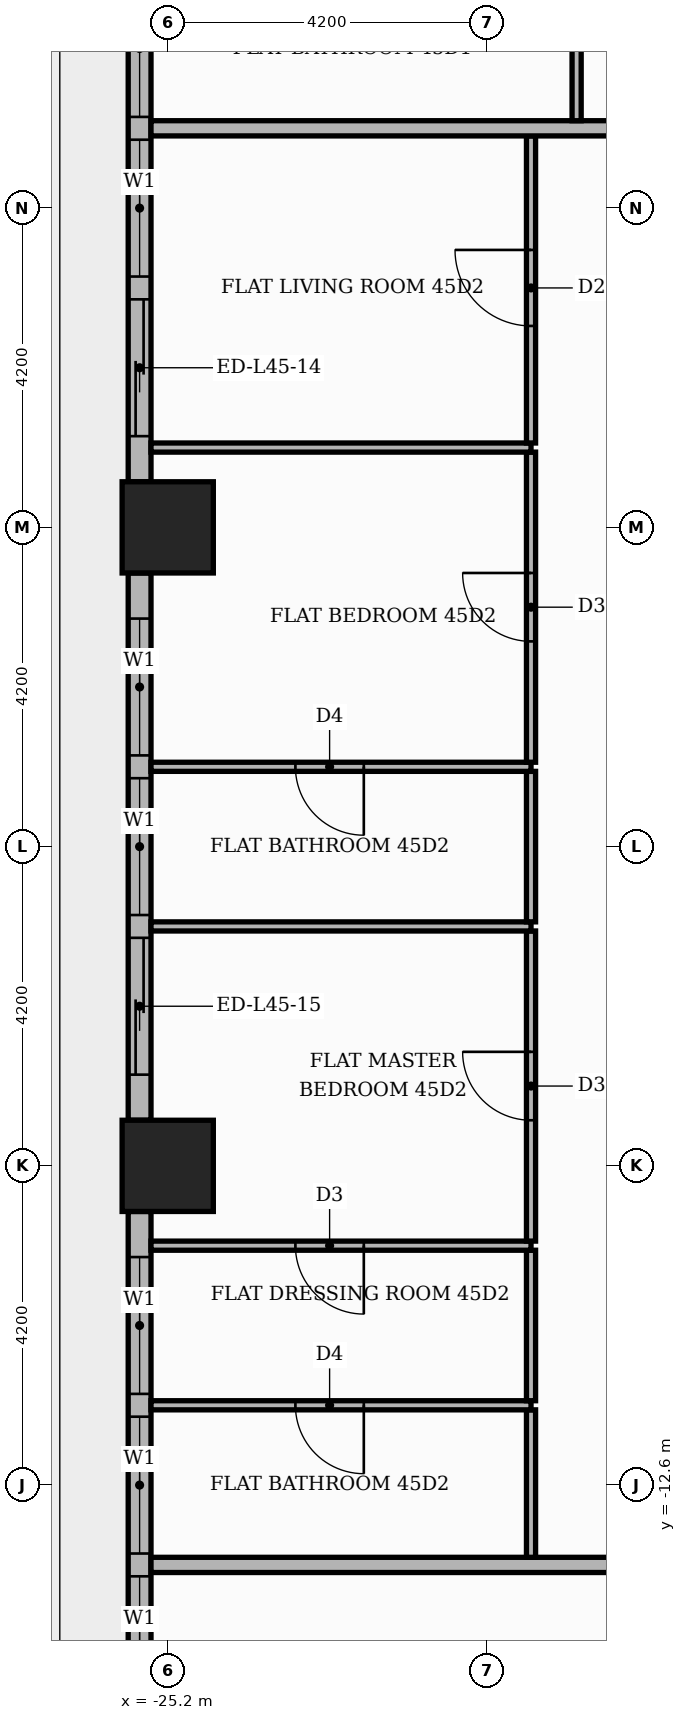
"""IFC4 building model, lengths in metres.
Left out: names, types, materials, properties, quantities, classifications, styles, units other than length and angle.
Written with IfcOpenShell. Run it as: python <this file> out.ifc"""

import sys

from ifc_helpers import new_model, si_unit, direction, frame, frame_2d, origin, origin_2d, place, context, subcontext, project, spatial, rectangle, extrude, element, fill, save


model = new_model("IFC4")
c1 = context("Model", 3, precision=1e-05, world=origin(), true_north=direction((0.0, 1.0)))
c2 = subcontext(c1, "Body", "Model", "MODEL_VIEW")
j1 = project(units=[si_unit("LENGTHUNIT", "METRE"), si_unit("PLANEANGLEUNIT", "RADIAN")], contexts=[c1])
p1 = place(None, origin())
s1 = spatial("IfcSite", under=j1, at=p1, CompositionType="ELEMENT")
p2 = place(p1, origin())
s2 = spatial("IfcBuilding", under=s1, at=p2, CompositionType="ELEMENT")
p3 = place(p2, frame((0.0, 0.0, 192.3)))
s3 = spatial("IfcBuildingStorey", under=s2, at=p3, CompositionType="ELEMENT", Elevation=192.3)
for number, where, z_axis, x_axis in (
    (1, (-25.2, 0.0, 0.0), (0.0, 0.0, 1.0), (1.0, 0.0, 0.0)),
    (2, (-25.2, -8.4, 0.0), (0.0, 0.0, 1.0), (1.0, 0.0, 0.0)),
):
    element("IfcColumn", number, at=place(p3, frame(where, z_axis=z_axis, x_axis=x_axis)), inside=s3, PredefinedType="COLUMN", context=c2, shape_type="SweptSolid", body=[
        extrude(rectangle(XDim=1.2, YDim=1.2, at=origin_2d()), origin(), (0.0, 0.0, 1.0), 3.9),
    ])
p4 = place(p3, frame((-25.57, 7.8, 0.0), z_axis=(0.0, 0.0, 1.0), x_axis=(0.0, -1.0, 0.0)))
e3 = element("IfcWall", 3, at=p4, inside=s3, PredefinedType="STANDARD", context=c2, shape_type="SweptSolid", body=[
    extrude(rectangle(XDim=7.2, YDim=0.3, at=frame_2d((3.6, 0.0))), origin(), (0.0, 0.0, 1.0), 3.48),
])
p5 = place(p4, frame((0.6, 0.0, 0.9)))
e4 = element("IfcOpeningElement", 4, at=p5, cuts=e3, PredefinedType="OPENING", context=c2, shape_type="SweptSolid", body=[
    extrude(rectangle(XDim=1.8, YDim=2.1, at=frame_2d((0.9, 1.05))), frame((0.0, 0.16, 0.0), z_axis=(0.0, -1.0, 0.0), x_axis=(1.0, 0.0, 0.0)), (0.0, 0.0, 1.0), 0.32),
])
p6 = place(p4, frame((2.7, 0.0, 0.9)))
e5 = element("IfcOpeningElement", 5, at=p6, cuts=e3, PredefinedType="OPENING", context=c2, shape_type="SweptSolid", body=[
    extrude(rectangle(XDim=1.8, YDim=2.1, at=frame_2d((0.9, 1.05))), frame((0.0, 0.16, 0.0), z_axis=(0.0, -1.0, 0.0), x_axis=(1.0, 0.0, 0.0)), (0.0, 0.0, 1.0), 0.32),
])
p7 = place(p4, frame((4.8, 0.0, 0.0)))
e6 = element("IfcOpeningElement", 6, at=p7, cuts=e3, PredefinedType="OPENING", context=c2, shape_type="SweptSolid", body=[
    extrude(rectangle(XDim=1.8, YDim=2.4, at=frame_2d((0.9, 1.2))), frame((0.0, 0.16, 0.0), z_axis=(0.0, -1.0, 0.0), x_axis=(1.0, 0.0, 0.0)), (0.0, 0.0, 1.0), 0.32),
])
p8 = place(p3, frame((-25.57, -0.6, 0.0), z_axis=(0.0, 0.0, 1.0), x_axis=(0.0, -1.0, 0.0)))
e7 = element("IfcWall", 7, at=p8, inside=s3, PredefinedType="STANDARD", context=c2, shape_type="SweptSolid", body=[
    extrude(rectangle(XDim=7.2, YDim=0.3, at=frame_2d((3.6, 0.0))), origin(), (0.0, 0.0, 1.0), 3.48),
])
p9 = place(p8, frame((0.6, 0.0, 0.9)))
e8 = element("IfcOpeningElement", 8, at=p9, cuts=e7, PredefinedType="OPENING", context=c2, shape_type="SweptSolid", body=[
    extrude(rectangle(XDim=1.8, YDim=2.1, at=frame_2d((0.9, 1.05))), frame((0.0, 0.16, 0.0), z_axis=(0.0, -1.0, 0.0), x_axis=(1.0, 0.0, 0.0)), (0.0, 0.0, 1.0), 0.32),
])
p10 = place(p8, frame((2.7, 0.0, 0.9)))
e9 = element("IfcOpeningElement", 9, at=p10, cuts=e7, PredefinedType="OPENING", context=c2, shape_type="SweptSolid", body=[
    extrude(rectangle(XDim=1.8, YDim=2.1, at=frame_2d((0.9, 1.05))), frame((0.0, 0.16, 0.0), z_axis=(0.0, -1.0, 0.0), x_axis=(1.0, 0.0, 0.0)), (0.0, 0.0, 1.0), 0.32),
])
p11 = place(p8, frame((4.8, 0.0, 0.0)))
e10 = element("IfcOpeningElement", 10, at=p11, cuts=e7, PredefinedType="OPENING", context=c2, shape_type="SweptSolid", body=[
    extrude(rectangle(XDim=1.8, YDim=2.4, at=frame_2d((0.9, 1.2))), frame((0.0, 0.16, 0.0), z_axis=(0.0, -1.0, 0.0), x_axis=(1.0, 0.0, 0.0)), (0.0, 0.0, 1.0), 0.32),
])
p12 = place(p3, frame((-25.57, -9.0, 0.0), z_axis=(0.0, 0.0, 1.0), x_axis=(0.0, -1.0, 0.0)))
e11 = element("IfcWall", 11, at=p12, inside=s3, PredefinedType="STANDARD", context=c2, shape_type="SweptSolid", body=[
    extrude(rectangle(XDim=7.2, YDim=0.3, at=frame_2d((3.6, 0.0))), origin(), (0.0, 0.0, 1.0), 3.48),
])
p13 = place(p12, frame((0.6, 0.0, 0.9)))
e12 = element("IfcOpeningElement", 12, at=p13, cuts=e11, PredefinedType="OPENING", context=c2, shape_type="SweptSolid", body=[
    extrude(rectangle(XDim=1.8, YDim=2.1, at=frame_2d((0.9, 1.05))), frame((0.0, 0.16, 0.0), z_axis=(0.0, -1.0, 0.0), x_axis=(1.0, 0.0, 0.0)), (0.0, 0.0, 1.0), 0.32),
])
p14 = place(p12, frame((2.7, 0.0, 0.9)))
e13 = element("IfcOpeningElement", 13, at=p14, cuts=e11, PredefinedType="OPENING", context=c2, shape_type="SweptSolid", body=[
    extrude(rectangle(XDim=1.8, YDim=2.1, at=frame_2d((0.9, 1.05))), frame((0.0, 0.16, 0.0), z_axis=(0.0, -1.0, 0.0), x_axis=(1.0, 0.0, 0.0)), (0.0, 0.0, 1.0), 0.32),
])
p15 = place(p12, frame((4.8, 0.0, 0.9)))
e14 = element("IfcOpeningElement", 14, at=p15, cuts=e11, PredefinedType="OPENING", context=c2, shape_type="SweptSolid", body=[
    extrude(rectangle(XDim=1.8, YDim=2.1, at=frame_2d((0.9, 1.05))), frame((0.0, 0.16, 0.0), z_axis=(0.0, -1.0, 0.0), x_axis=(1.0, 0.0, 0.0)), (0.0, 0.0, 1.0), 0.32),
])
p16 = place(p3, frame((-25.42, -13.65, 0.0), z_axis=(0.0, 0.0, 1.0), x_axis=(1.0, 0.0, 0.0)))
e15 = element("IfcWall", 15, at=p16, inside=s3, PredefinedType="PARTITIONING", context=c2, shape_type="SweptSolid", body=[
    extrude(rectangle(XDim=39.07, YDim=0.2, at=frame_2d((19.535, 0.0))), origin(), (0.0, 0.0, 1.0), 3.48),
])
p17 = place(p16, frame((13.32, 0.0, 0.0)))
e16 = element("IfcOpeningElement", 16, at=p17, cuts=e15, PredefinedType="OPENING", context=c2, shape_type="SweptSolid", body=[
    extrude(rectangle(XDim=1.1, YDim=2.4, at=frame_2d((0.55, 1.2))), frame((0.0, 0.11, 0.0), z_axis=(0.0, -1.0, 0.0), x_axis=(1.0, 0.0, 0.0)), (0.0, 0.0, 1.0), 0.22),
])
p18 = place(p16, frame((25.92, 0.0, 0.0)))
e17 = element("IfcOpeningElement", 17, at=p18, cuts=e15, PredefinedType="OPENING", context=c2, shape_type="SweptSolid", body=[
    extrude(rectangle(XDim=1.1, YDim=2.4, at=frame_2d((0.55, 1.2))), frame((0.0, 0.11, 0.0), z_axis=(0.0, -1.0, 0.0), x_axis=(1.0, 0.0, 0.0)), (0.0, 0.0, 1.0), 0.22),
])
p19 = place(p3, frame((-20.42, -13.55, 0.0), z_axis=(0.0, 0.0, 1.0), x_axis=(0.0, 1.0, 0.0)))
e18 = element("IfcWall", 18, at=p19, inside=s3, PredefinedType="PARTITIONING", context=c2, shape_type="SweptSolid", body=[
    extrude(rectangle(XDim=1.94, YDim=0.12, at=frame_2d((0.97, 0.0))), origin(), (0.0, 0.0, 1.0), 3.48),
])
p20 = place(p3, frame((-25.42, -11.55, 0.0), z_axis=(0.0, 0.0, 1.0), x_axis=(1.0, 0.0, 0.0)))
e19 = element("IfcWall", 19, at=p20, inside=s3, PredefinedType="PARTITIONING", context=c2, shape_type="SweptSolid", body=[
    extrude(rectangle(XDim=5.0, YDim=0.12, at=frame_2d((2.5, 0.0))), origin(), (0.0, 0.0, 1.0), 3.48),
])
p21 = place(p20, frame((1.9, 0.0, 0.0)))
e20 = element("IfcOpeningElement", 20, at=p21, cuts=e19, PredefinedType="OPENING", context=c2, shape_type="SweptSolid", body=[
    extrude(rectangle(XDim=0.9, YDim=2.1, at=frame_2d((0.45, 1.05))), frame((0.0, 0.07, 0.0), z_axis=(0.0, -1.0, 0.0), x_axis=(1.0, 0.0, 0.0)), (0.0, 0.0, 1.0), 0.14),
])
p22 = place(p3, frame((-20.42, -11.49, 0.0), z_axis=(0.0, 0.0, 1.0), x_axis=(0.0, 1.0, 0.0)))
e21 = element("IfcWall", 21, at=p22, inside=s3, PredefinedType="PARTITIONING", context=c2, shape_type="SweptSolid", body=[
    extrude(rectangle(XDim=1.98, YDim=0.12, at=frame_2d((0.99, 0.0))), origin(), (0.0, 0.0, 1.0), 3.48),
])
p23 = place(p3, frame((-25.42, -9.45, 0.0), z_axis=(0.0, 0.0, 1.0), x_axis=(1.0, 0.0, 0.0)))
e22 = element("IfcWall", 22, at=p23, inside=s3, PredefinedType="PARTITIONING", context=c2, shape_type="SweptSolid", body=[
    extrude(rectangle(XDim=5.0, YDim=0.12, at=frame_2d((2.5, 0.0))), origin(), (0.0, 0.0, 1.0), 3.48),
])
p24 = place(p23, frame((1.9, 0.0, 0.0)))
e23 = element("IfcOpeningElement", 23, at=p24, cuts=e22, PredefinedType="OPENING", context=c2, shape_type="SweptSolid", body=[
    extrude(rectangle(XDim=0.9, YDim=2.1, at=frame_2d((0.45, 1.05))), frame((0.0, 0.07, 0.0), z_axis=(0.0, -1.0, 0.0), x_axis=(1.0, 0.0, 0.0)), (0.0, 0.0, 1.0), 0.14),
])
p25 = place(p3, frame((-20.42, -9.39, 0.0), z_axis=(0.0, 0.0, 1.0), x_axis=(0.0, 1.0, 0.0)))
e24 = element("IfcWall", 24, at=p25, inside=s3, PredefinedType="PARTITIONING", context=c2, shape_type="SweptSolid", body=[
    extrude(rectangle(XDim=4.08, YDim=0.12, at=frame_2d((2.04, 0.0))), origin(), (0.0, 0.0, 1.0), 3.48),
])
p26 = place(p25, frame((1.59, 0.0, 0.0)))
e25 = element("IfcOpeningElement", 25, at=p26, cuts=e24, PredefinedType="OPENING", context=c2, shape_type="SweptSolid", body=[
    extrude(rectangle(XDim=0.9, YDim=2.1, at=frame_2d((0.45, 1.05))), frame((0.0, 0.07, 0.0), z_axis=(0.0, -1.0, 0.0), x_axis=(1.0, 0.0, 0.0)), (0.0, 0.0, 1.0), 0.14),
])
p27 = place(p3, frame((-25.42, -5.25, 0.0), z_axis=(0.0, 0.0, 1.0), x_axis=(1.0, 0.0, 0.0)))
e26 = element("IfcWall", 26, at=p27, inside=s3, PredefinedType="PARTITIONING", context=c2, shape_type="SweptSolid", body=[
    extrude(rectangle(XDim=5.0, YDim=0.12, at=frame_2d((2.5, 0.0))), origin(), (0.0, 0.0, 1.0), 3.48),
])
p28 = place(p3, frame((-20.42, -5.19, 0.0), z_axis=(0.0, 0.0, 1.0), x_axis=(0.0, 1.0, 0.0)))
e27 = element("IfcWall", 27, at=p28, inside=s3, PredefinedType="PARTITIONING", context=c2, shape_type="SweptSolid", body=[
    extrude(rectangle(XDim=1.98, YDim=0.12, at=frame_2d((0.99, 0.0))), origin(), (0.0, 0.0, 1.0), 3.48),
])
p29 = place(p3, frame((-25.42, -3.15, 0.0), z_axis=(0.0, 0.0, 1.0), x_axis=(1.0, 0.0, 0.0)))
e28 = element("IfcWall", 28, at=p29, inside=s3, PredefinedType="PARTITIONING", context=c2, shape_type="SweptSolid", body=[
    extrude(rectangle(XDim=5.0, YDim=0.12, at=frame_2d((2.5, 0.0))), origin(), (0.0, 0.0, 1.0), 3.48),
])
p30 = place(p29, frame((1.9, 0.0, 0.0)))
e29 = element("IfcOpeningElement", 29, at=p30, cuts=e28, PredefinedType="OPENING", context=c2, shape_type="SweptSolid", body=[
    extrude(rectangle(XDim=0.9, YDim=2.1, at=frame_2d((0.45, 1.05))), frame((0.0, 0.07, 0.0), z_axis=(0.0, -1.0, 0.0), x_axis=(1.0, 0.0, 0.0)), (0.0, 0.0, 1.0), 0.14),
])
p31 = place(p3, frame((-20.42, -3.09, 0.0), z_axis=(0.0, 0.0, 1.0), x_axis=(0.0, 1.0, 0.0)))
e30 = element("IfcWall", 30, at=p31, inside=s3, PredefinedType="PARTITIONING", context=c2, shape_type="SweptSolid", body=[
    extrude(rectangle(XDim=4.08, YDim=0.12, at=frame_2d((2.04, 0.0))), origin(), (0.0, 0.0, 1.0), 3.48),
])
p32 = place(p31, frame((1.59, 0.0, 0.0)))
e31 = element("IfcOpeningElement", 31, at=p32, cuts=e30, PredefinedType="OPENING", context=c2, shape_type="SweptSolid", body=[
    extrude(rectangle(XDim=0.9, YDim=2.1, at=frame_2d((0.45, 1.05))), frame((0.0, 0.07, 0.0), z_axis=(0.0, -1.0, 0.0), x_axis=(1.0, 0.0, 0.0)), (0.0, 0.0, 1.0), 0.14),
])
p33 = place(p3, frame((-25.42, 1.05, 0.0), z_axis=(0.0, 0.0, 1.0), x_axis=(1.0, 0.0, 0.0)))
e32 = element("IfcWall", 32, at=p33, inside=s3, PredefinedType="PARTITIONING", context=c2, shape_type="SweptSolid", body=[
    extrude(rectangle(XDim=5.0, YDim=0.12, at=frame_2d((2.5, 0.0))), origin(), (0.0, 0.0, 1.0), 3.48),
])
p34 = place(p3, frame((-20.42, 1.11, 0.0), z_axis=(0.0, 0.0, 1.0), x_axis=(0.0, 1.0, 0.0)))
e33 = element("IfcWall", 33, at=p34, inside=s3, PredefinedType="PARTITIONING", context=c2, shape_type="SweptSolid", body=[
    extrude(rectangle(XDim=4.04, YDim=0.12, at=frame_2d((2.02, 0.0))), origin(), (0.0, 0.0, 1.0), 3.48),
])
p35 = place(p34, frame((1.54, 0.0, 0.0)))
e34 = element("IfcOpeningElement", 34, at=p35, cuts=e33, PredefinedType="OPENING", context=c2, shape_type="SweptSolid", body=[
    extrude(rectangle(XDim=1.0, YDim=2.1, at=frame_2d((0.5, 1.05))), frame((0.0, 0.07, 0.0), z_axis=(0.0, -1.0, 0.0), x_axis=(1.0, 0.0, 0.0)), (0.0, 0.0, 1.0), 0.14),
])
p36 = place(p3, frame((-25.42, 5.25, 0.0), z_axis=(0.0, 0.0, 1.0), x_axis=(1.0, 0.0, 0.0)))
e35 = element("IfcWall", 35, at=p36, inside=s3, PredefinedType="PARTITIONING", context=c2, shape_type="SweptSolid", body=[
    extrude(rectangle(XDim=11.77, YDim=0.2, at=frame_2d((5.885, 0.0))), origin(), (0.0, 0.0, 1.0), 3.48),
])
p37 = place(p3, frame((-19.82, 5.35, 0.0), z_axis=(0.0, 0.0, 1.0), x_axis=(0.0, 1.0, 0.0)))
e36 = element("IfcWall", 36, at=p37, inside=s3, PredefinedType="PARTITIONING", context=c2, shape_type="SweptSolid", body=[
    extrude(rectangle(XDim=1.94, YDim=0.12, at=frame_2d((0.97, 0.0))), origin(), (0.0, 0.0, 1.0), 3.48),
])
p38 = place(p5, origin())
e37 = element("IfcWindow", 37, at=p38, inside=s3, PartitioningType="SINGLE_PANEL", PredefinedType="WINDOW", context=c2, shape_type="SweptSolid", body=[
    extrude(rectangle(XDim=1.8, YDim=2.1, at=frame_2d((0.9, 1.05))), frame((0.0, 0.03, 0.0), z_axis=(0.0, -1.0, 0.0), x_axis=(1.0, 0.0, 0.0)), (0.0, 0.0, 1.0), 0.06),
])
fill(e4, e37)
p39 = place(p6, origin())
e38 = element("IfcWindow", 38, at=p39, inside=s3, PartitioningType="SINGLE_PANEL", PredefinedType="WINDOW", context=c2, shape_type="SweptSolid", body=[
    extrude(rectangle(XDim=1.8, YDim=2.1, at=frame_2d((0.9, 1.05))), frame((0.0, 0.03, 0.0), z_axis=(0.0, -1.0, 0.0), x_axis=(1.0, 0.0, 0.0)), (0.0, 0.0, 1.0), 0.06),
])
fill(e5, e38)
p40 = place(p7, origin())
e39 = element("IfcDoor", 39, at=p40, inside=s3, OperationType="SLIDING_TO_RIGHT", PredefinedType="DOOR", context=c2, shape_type="SweptSolid", body=[
    extrude(rectangle(XDim=1.8, YDim=2.4, at=frame_2d((0.9, 1.2))), frame((0.0, 0.025, 0.0), z_axis=(0.0, -1.0, 0.0), x_axis=(1.0, 0.0, 0.0)), (0.0, 0.0, 1.0), 0.05),
])
fill(e6, e39)
p41 = place(p9, origin())
e40 = element("IfcWindow", 40, at=p41, inside=s3, PartitioningType="SINGLE_PANEL", PredefinedType="WINDOW", context=c2, shape_type="SweptSolid", body=[
    extrude(rectangle(XDim=1.8, YDim=2.1, at=frame_2d((0.9, 1.05))), frame((0.0, 0.03, 0.0), z_axis=(0.0, -1.0, 0.0), x_axis=(1.0, 0.0, 0.0)), (0.0, 0.0, 1.0), 0.06),
])
fill(e8, e40)
p42 = place(p10, origin())
e41 = element("IfcWindow", 41, at=p42, inside=s3, PartitioningType="SINGLE_PANEL", PredefinedType="WINDOW", context=c2, shape_type="SweptSolid", body=[
    extrude(rectangle(XDim=1.8, YDim=2.1, at=frame_2d((0.9, 1.05))), frame((0.0, 0.03, 0.0), z_axis=(0.0, -1.0, 0.0), x_axis=(1.0, 0.0, 0.0)), (0.0, 0.0, 1.0), 0.06),
])
fill(e9, e41)
p43 = place(p11, origin())
e42 = element("IfcDoor", 42, at=p43, inside=s3, OperationType="SLIDING_TO_RIGHT", PredefinedType="DOOR", context=c2, shape_type="SweptSolid", body=[
    extrude(rectangle(XDim=1.8, YDim=2.4, at=frame_2d((0.9, 1.2))), frame((0.0, 0.025, 0.0), z_axis=(0.0, -1.0, 0.0), x_axis=(1.0, 0.0, 0.0)), (0.0, 0.0, 1.0), 0.05),
])
fill(e10, e42)
p44 = place(p13, origin())
e43 = element("IfcWindow", 43, at=p44, inside=s3, PartitioningType="SINGLE_PANEL", PredefinedType="WINDOW", context=c2, shape_type="SweptSolid", body=[
    extrude(rectangle(XDim=1.8, YDim=2.1, at=frame_2d((0.9, 1.05))), frame((0.0, 0.03, 0.0), z_axis=(0.0, -1.0, 0.0), x_axis=(1.0, 0.0, 0.0)), (0.0, 0.0, 1.0), 0.06),
])
fill(e12, e43)
p45 = place(p14, origin())
e44 = element("IfcWindow", 44, at=p45, inside=s3, PartitioningType="SINGLE_PANEL", PredefinedType="WINDOW", context=c2, shape_type="SweptSolid", body=[
    extrude(rectangle(XDim=1.8, YDim=2.1, at=frame_2d((0.9, 1.05))), frame((0.0, 0.03, 0.0), z_axis=(0.0, -1.0, 0.0), x_axis=(1.0, 0.0, 0.0)), (0.0, 0.0, 1.0), 0.06),
])
fill(e13, e44)
p46 = place(p15, origin())
e45 = element("IfcWindow", 45, at=p46, inside=s3, PartitioningType="SINGLE_PANEL", PredefinedType="WINDOW", context=c2, shape_type="SweptSolid", body=[
    extrude(rectangle(XDim=1.8, YDim=2.1, at=frame_2d((0.9, 1.05))), frame((0.0, 0.03, 0.0), z_axis=(0.0, -1.0, 0.0), x_axis=(1.0, 0.0, 0.0)), (0.0, 0.0, 1.0), 0.06),
])
fill(e14, e45)
p47 = place(p35, origin())
e46 = element("IfcDoor", 46, at=p47, inside=s3, OperationType="SINGLE_SWING_RIGHT", PredefinedType="DOOR", context=c2, shape_type="SweptSolid", body=[
    extrude(rectangle(XDim=1.0, YDim=2.1, at=frame_2d((0.5, 1.05))), frame((0.0, 0.025, 0.0), z_axis=(0.0, -1.0, 0.0), x_axis=(1.0, 0.0, 0.0)), (0.0, 0.0, 1.0), 0.05),
])
fill(e34, e46)
p48 = place(p32, origin())
e47 = element("IfcDoor", 47, at=p48, inside=s3, OperationType="SINGLE_SWING_RIGHT", PredefinedType="DOOR", context=c2, shape_type="SweptSolid", body=[
    extrude(rectangle(XDim=0.9, YDim=2.1, at=frame_2d((0.45, 1.05))), frame((0.0, 0.025, 0.0), z_axis=(0.0, -1.0, 0.0), x_axis=(1.0, 0.0, 0.0)), (0.0, 0.0, 1.0), 0.05),
])
fill(e31, e47)
p49 = place(p30, frame((0.9, 0.0, 0.0), z_axis=(0.0, 0.0, 1.0), x_axis=(-1.0, 0.0, 0.0)))
e48 = element("IfcDoor", 48, at=p49, inside=s3, OperationType="SINGLE_SWING_RIGHT", PredefinedType="DOOR", context=c2, shape_type="SweptSolid", body=[
    extrude(rectangle(XDim=0.9, YDim=2.1, at=frame_2d((0.45, 1.05))), frame((0.0, 0.025, 0.0), z_axis=(0.0, -1.0, 0.0), x_axis=(1.0, 0.0, 0.0)), (0.0, 0.0, 1.0), 0.05),
])
fill(e29, e48)
p50 = place(p26, origin())
e49 = element("IfcDoor", 49, at=p50, inside=s3, OperationType="SINGLE_SWING_RIGHT", PredefinedType="DOOR", context=c2, shape_type="SweptSolid", body=[
    extrude(rectangle(XDim=0.9, YDim=2.1, at=frame_2d((0.45, 1.05))), frame((0.0, 0.025, 0.0), z_axis=(0.0, -1.0, 0.0), x_axis=(1.0, 0.0, 0.0)), (0.0, 0.0, 1.0), 0.05),
])
fill(e25, e49)
p51 = place(p24, frame((0.9, 0.0, 0.0), z_axis=(0.0, 0.0, 1.0), x_axis=(-1.0, 0.0, 0.0)))
e50 = element("IfcDoor", 50, at=p51, inside=s3, OperationType="SINGLE_SWING_RIGHT", PredefinedType="DOOR", context=c2, shape_type="SweptSolid", body=[
    extrude(rectangle(XDim=0.9, YDim=2.1, at=frame_2d((0.45, 1.05))), frame((0.0, 0.025, 0.0), z_axis=(0.0, -1.0, 0.0), x_axis=(1.0, 0.0, 0.0)), (0.0, 0.0, 1.0), 0.05),
])
fill(e23, e50)
p52 = place(p21, frame((0.9, 0.0, 0.0), z_axis=(0.0, 0.0, 1.0), x_axis=(-1.0, 0.0, 0.0)))
e51 = element("IfcDoor", 51, at=p52, inside=s3, OperationType="SINGLE_SWING_RIGHT", PredefinedType="DOOR", context=c2, shape_type="SweptSolid", body=[
    extrude(rectangle(XDim=0.9, YDim=2.1, at=frame_2d((0.45, 1.05))), frame((0.0, 0.025, 0.0), z_axis=(0.0, -1.0, 0.0), x_axis=(1.0, 0.0, 0.0)), (0.0, 0.0, 1.0), 0.05),
])
fill(e20, e51)
save(model, sys.argv[1])
